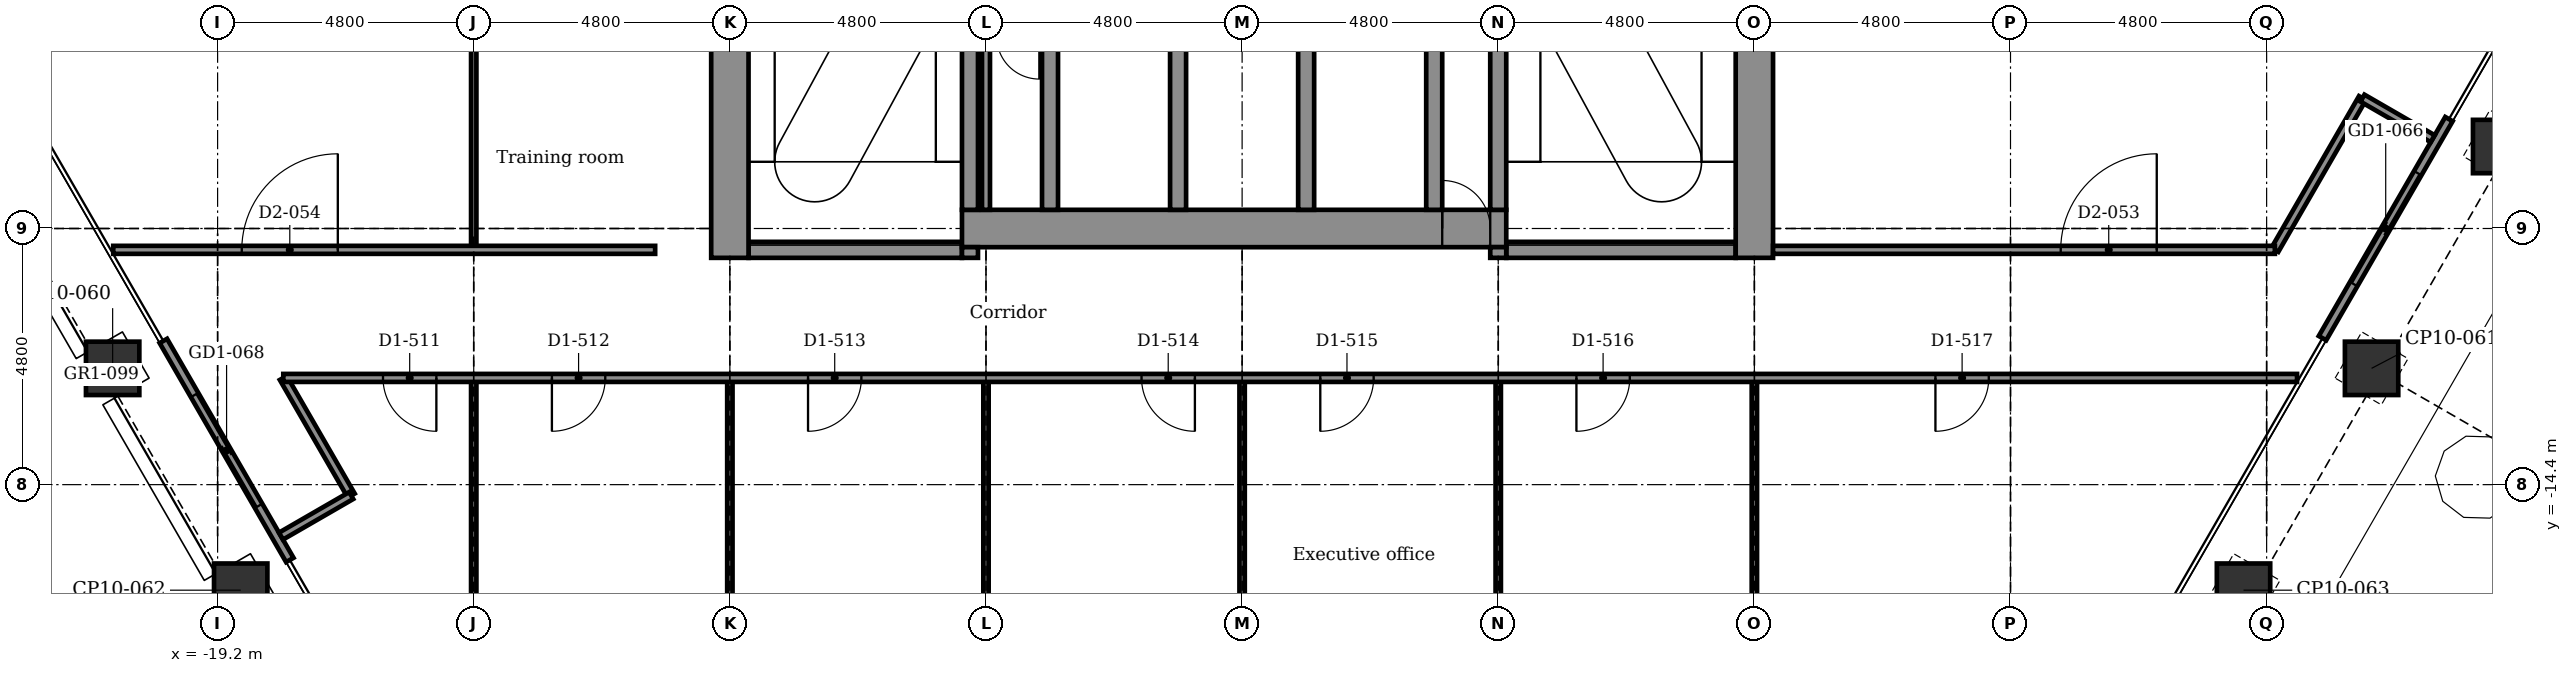
"""IFC4 building model, lengths in metres.
Left out: names, types, materials, properties, quantities, classifications, styles, units other than length and angle.
Written with IfcOpenShell. Run it as: python <this file> out.ifc"""

import sys

from ifc_helpers import new_model, si_unit, direction, frame, frame_2d, origin, origin_2d, place, context, subcontext, project, spatial, rectangle, extrude, element, fill, save


model = new_model("IFC4")
c1 = context("Model", 3, precision=1e-05, world=origin(), true_north=direction((0.0, 1.0)))
c2 = subcontext(c1, "Body", "Model", "MODEL_VIEW")
j1 = project(units=[si_unit("LENGTHUNIT", "METRE"), si_unit("PLANEANGLEUNIT", "RADIAN")], contexts=[c1])
p1 = place(None, origin())
s1 = spatial("IfcSite", under=j1, at=p1, CompositionType="ELEMENT")
p2 = place(p1, origin())
s2 = spatial("IfcBuilding", under=s1, at=p2, CompositionType="ELEMENT")
p3 = place(p2, frame((0.0, 0.0, 181.7)))
s3 = spatial("IfcBuildingStorey", under=s2, at=p3, CompositionType="ELEMENT", Elevation=181.7)
for number, where, z_axis, x_axis in (
    (1, (23.567, -8.064, -0.15), (0.0, 0.0, 1.0), (0.5, 0.866, 0.0)),
    (2, (21.167, -12.221, -0.15), (0.0, 0.0, 1.0), (0.5, 0.866, 0.0)),
    (3, (18.767, -16.378, -0.15), (0.0, 0.0, 1.0), (0.5, 0.866, 0.0)),
    (4, (-18.767, -16.378, -0.15), (0.0, 0.0, 1.0), (0.866, 0.5, 0.0)),
    (5, (-21.167, -12.221, -0.15), (0.0, 0.0, 1.0), (0.866, 0.5, 0.0)),
):
    element("IfcColumn", number, at=place(p3, frame(where, z_axis=z_axis, x_axis=x_axis)), inside=s3, PredefinedType="COLUMN", context=c2, shape_type="SweptSolid", body=[
        extrude(rectangle(XDim=1.0, YDim=1.0, at=origin_2d()), origin(), (0.0, 0.0, 1.0), 3.9),
    ])
p4 = place(p3, frame((-9.25, -10.0, -0.15), z_axis=(0.0, 0.0, 1.0), x_axis=(1.0, 0.0, 0.0)))
e6 = element("IfcWall", 6, at=p4, inside=s3, PredefinedType="STANDARD", context=c2, shape_type="SweptSolid", body=[
    extrude(rectangle(XDim=4.0, YDim=0.3, at=frame_2d((2.0, 0.0))), origin(), (0.0, 0.0, 1.0), 3.9),
])
p5 = place(p3, frame((4.95, -10.0, -0.15), z_axis=(0.0, 0.0, 1.0), x_axis=(1.0, 0.0, 0.0)))
e7 = element("IfcWall", 7, at=p5, inside=s3, PredefinedType="STANDARD", context=c2, shape_type="SweptSolid", body=[
    extrude(rectangle(XDim=4.3, YDim=0.3, at=frame_2d((2.15, 0.0))), origin(), (0.0, 0.0, 1.0), 3.9),
])
p6 = place(p3, frame((-5.25, -9.6, -0.15), z_axis=(0.0, 0.0, 1.0), x_axis=(1.0, 0.0, 0.0)))
e8 = element("IfcWall", 8, at=p6, inside=s3, PredefinedType="SHEAR", context=c2, shape_type="SweptSolid", body=[
    extrude(rectangle(XDim=10.2, YDim=0.7, at=frame_2d((5.1, 0.0))), origin(), (0.0, 0.0, 1.0), 3.9),
])
p7 = place(p6, frame((9.0, 0.0, 0.15)))
e9 = element("IfcOpeningElement", 9, at=p7, cuts=e8, PredefinedType="OPENING", context=c2, shape_type="SweptSolid", body=[
    extrude(rectangle(XDim=0.9, YDim=2.1, at=frame_2d((0.45, 1.05))), frame((0.0, 0.36, 0.0), z_axis=(0.0, -1.0, 0.0), x_axis=(1.0, 0.0, 0.0)), (0.0, 0.0, 1.0), 0.72),
])
p8 = place(p3, frame((-9.6, -10.15, -0.15), z_axis=(0.0, 0.0, 1.0), x_axis=(0.0, 1.0, 0.0)))
e10 = element("IfcWall", 10, at=p8, inside=s3, PredefinedType="SHEAR", context=c2, shape_type="SweptSolid", body=[
    extrude(rectangle(XDim=7.6, YDim=0.7, at=frame_2d((3.8, 0.0))), origin(), (0.0, 0.0, 1.0), 3.9),
])
p9 = place(p3, frame((-5.1, -10.15, -0.15), z_axis=(0.0, 0.0, 1.0), x_axis=(0.0, 1.0, 0.0)))
e11 = element("IfcWall", 11, at=p9, inside=s3, PredefinedType="STANDARD", context=c2, shape_type="SweptSolid", body=[
    extrude(rectangle(XDim=0.2, YDim=0.3, at=frame_2d((0.1, 0.0))), origin(), (0.0, 0.0, 1.0), 3.9),
])
p10 = place(p3, frame((-5.1, -9.25, -0.15), z_axis=(0.0, 0.0, 1.0), x_axis=(0.0, 1.0, 0.0)))
e12 = element("IfcWall", 12, at=p10, inside=s3, PredefinedType="STANDARD", context=c2, shape_type="SweptSolid", body=[
    extrude(rectangle(XDim=7.0, YDim=0.3, at=frame_2d((3.5, 0.0))), origin(), (0.0, 0.0, 1.0), 3.9),
])
p11 = place(p10, frame((3.8, 0.0, 0.15)))
e13 = element("IfcOpeningElement", 13, at=p11, cuts=e12, PredefinedType="OPENING", context=c2, shape_type="SweptSolid", body=[
    extrude(rectangle(XDim=1.2, YDim=2.1, at=frame_2d((0.6, 1.05))), frame((0.0, 0.16, 0.0), z_axis=(0.0, -1.0, 0.0), x_axis=(1.0, 0.0, 0.0)), (0.0, 0.0, 1.0), 0.32),
])
for number, where, z_axis, x_axis in (
    (14, (-3.6, -9.25, -0.15), (0.0, 0.0, 1.0), (0.0, 1.0, 0.0)),
    (15, (-1.2, -9.25, -0.15), (0.0, 0.0, 1.0), (0.0, 1.0, 0.0)),
    (16, (1.2, -9.25, -0.15), (0.0, 0.0, 1.0), (0.0, 1.0, 0.0)),
    (17, (3.6, -9.25, -0.15), (0.0, 0.0, 1.0), (0.0, 1.0, 0.0)),
):
    element("IfcWall", number, at=place(p3, frame(where, z_axis=z_axis, x_axis=x_axis)), inside=s3, PredefinedType="STANDARD", context=c2, shape_type="SweptSolid", body=[
        extrude(rectangle(XDim=3.4, YDim=0.3, at=frame_2d((1.7, 0.0))), origin(), (0.0, 0.0, 1.0), 3.9),
    ])
p12 = place(p3, frame((4.8, -10.15, -0.15), z_axis=(0.0, 0.0, 1.0), x_axis=(0.0, 1.0, 0.0)))
e18 = element("IfcWall", 18, at=p12, inside=s3, PredefinedType="STANDARD", context=c2, shape_type="SweptSolid", body=[
    extrude(rectangle(XDim=0.2, YDim=0.3, at=frame_2d((0.1, 0.0))), origin(), (0.0, 0.0, 1.0), 3.9),
])
p13 = place(p3, frame((4.8, -9.25, -0.15), z_axis=(0.0, 0.0, 1.0), x_axis=(0.0, 1.0, 0.0)))
e19 = element("IfcWall", 19, at=p13, inside=s3, PredefinedType="STANDARD", context=c2, shape_type="SweptSolid", body=[
    extrude(rectangle(XDim=7.0, YDim=0.3, at=frame_2d((3.5, 0.0))), origin(), (0.0, 0.0, 1.0), 3.9),
])
p14 = place(p13, frame((3.8, 0.0, 0.15)))
e20 = element("IfcOpeningElement", 20, at=p14, cuts=e19, PredefinedType="OPENING", context=c2, shape_type="SweptSolid", body=[
    extrude(rectangle(XDim=1.2, YDim=2.1, at=frame_2d((0.6, 1.05))), frame((0.0, 0.16, 0.0), z_axis=(0.0, -1.0, 0.0), x_axis=(1.0, 0.0, 0.0)), (0.0, 0.0, 1.0), 0.32),
])
p15 = place(p3, frame((9.6, -10.15, -0.15), z_axis=(0.0, 0.0, 1.0), x_axis=(0.0, 1.0, 0.0)))
e21 = element("IfcWall", 21, at=p15, inside=s3, PredefinedType="SHEAR", context=c2, shape_type="SweptSolid", body=[
    extrude(rectangle(XDim=20.1, YDim=0.7, at=frame_2d((10.05, 0.0))), origin(), (0.0, 0.0, 1.0), 3.9),
])
p16 = place(p3, frame((22.617, -7.55, 0.0), z_axis=(0.0, 0.0, 1.0), x_axis=(-0.5000167099, -0.866015756104, 0.0)))
e22 = element("IfcWall", 22, at=p16, inside=s3, PredefinedType="PARTITIONING", context=c2, shape_type="SweptSolid", body=[
    extrude(rectangle(XDim=4.74, YDim=0.16, at=frame_2d((2.37, 0.0))), origin(), (0.0, 0.0, 1.0), 3.75),
])
p17 = place(p16, frame((1.17, 0.0, 0.0)))
e23 = element("IfcOpeningElement", 23, at=p17, cuts=e22, PredefinedType="OPENING", context=c2, shape_type="SweptSolid", body=[
    extrude(rectangle(XDim=2.4, YDim=2.4, at=frame_2d((1.2, 1.2))), frame((0.0, 0.09, 0.0), z_axis=(0.0, -1.0, 0.0), x_axis=(1.0, 0.0, 0.0)), (0.0, 0.0, 1.0), 0.18),
])
p18 = place(p3, frame((-17.847, -15.812, 0.0), z_axis=(0.0, 0.0, 1.0), x_axis=(-0.5000167099, 0.866015756104, 0.0)))
e24 = element("IfcWall", 24, at=p18, inside=s3, PredefinedType="PARTITIONING", context=c2, shape_type="SweptSolid", body=[
    extrude(rectangle(XDim=4.74, YDim=0.16, at=frame_2d((2.37, 0.0))), origin(), (0.0, 0.0, 1.0), 3.75),
])
p19 = place(p18, frame((1.17, 0.0, 0.0)))
e25 = element("IfcOpeningElement", 25, at=p19, cuts=e24, PredefinedType="OPENING", context=c2, shape_type="SweptSolid", body=[
    extrude(rectangle(XDim=2.4, YDim=2.4, at=frame_2d((1.2, 1.2))), frame((0.0, 0.09, 0.0), z_axis=(0.0, -1.0, 0.0), x_axis=(1.0, 0.0, 0.0)), (0.0, 0.0, 1.0), 0.18),
])
p20 = place(p3, frame((9.6, -23.271, 0.0), z_axis=(0.0, 0.0, 1.0), x_axis=(0.0, 1.0, 0.0)))
e26 = element("IfcWall", 26, at=p20, inside=s3, PredefinedType="PARTITIONING", context=c2, shape_type="SweptSolid", body=[
    extrude(rectangle(XDim=10.872, YDim=0.1, at=frame_2d((5.436, 0.0))), origin(), (0.0, 0.0, 1.0), 3.066),
])
for number, where, z_axis, x_axis in (
    (27, (4.8, -23.281, 0.0), (0.0, 0.0, 1.0), (0.0, 1.0, 0.0)),
    (28, (0.0, -23.281, 0.0), (0.0, 0.0, 1.0), (0.0, 1.0, 0.0)),
):
    element("IfcWall", number, at=place(p3, frame(where, z_axis=z_axis, x_axis=x_axis)), inside=s3, PredefinedType="PARTITIONING", context=c2, shape_type="SweptSolid", body=[
        extrude(rectangle(XDim=10.882, YDim=0.1, at=frame_2d((5.441, 0.0))), origin(), (0.0, 0.0, 1.0), 3.066),
    ])
p21 = place(p3, frame((-4.8, -23.271, 0.0), z_axis=(0.0, 0.0, 1.0), x_axis=(0.0, 1.0, 0.0)))
e29 = element("IfcWall", 29, at=p21, inside=s3, PredefinedType="PARTITIONING", context=c2, shape_type="SweptSolid", body=[
    extrude(rectangle(XDim=10.872, YDim=0.1, at=frame_2d((5.436, 0.0))), origin(), (0.0, 0.0, 1.0), 3.066),
])
p22 = place(p3, frame((-4.8, -9.25, 0.0), z_axis=(0.0, 0.0, 1.0), x_axis=(0.0, 1.0, 0.0)))
e30 = element("IfcWall", 30, at=p22, inside=s3, PredefinedType="PARTITIONING", context=c2, shape_type="SweptSolid", body=[
    extrude(rectangle(XDim=3.25, YDim=0.15, at=frame_2d((1.625, 0.0))), origin(), (0.0, 0.0, 1.0), 3.75),
])
p23 = place(p3, frame((-9.6, -23.271, 0.0), z_axis=(0.0, 0.0, 1.0), x_axis=(0.0, 1.0, 0.0)))
e31 = element("IfcWall", 31, at=p23, inside=s3, PredefinedType="PARTITIONING", context=c2, shape_type="SweptSolid", body=[
    extrude(rectangle(XDim=10.872, YDim=0.1, at=frame_2d((5.436, 0.0))), origin(), (0.0, 0.0, 1.0), 3.066),
])
p24 = place(p3, frame((-14.4, -21.701, 0.0), z_axis=(0.0, 0.0, 1.0), x_axis=(0.0, 1.0, 0.0)))
e32 = element("IfcWall", 32, at=p24, inside=s3, PredefinedType="PARTITIONING", context=c2, shape_type="SweptSolid", body=[
    extrude(rectangle(XDim=9.302, YDim=0.1, at=frame_2d((4.651, 0.0))), origin(), (0.0, 0.0, 1.0), 3.066),
])
p25 = place(p3, frame((-14.4, -10.0, 0.0), z_axis=(0.0, 0.0, 1.0), x_axis=(0.0, 1.0, 0.0)))
e33 = element("IfcWall", 33, at=p25, inside=s3, PredefinedType="PARTITIONING", context=c2, shape_type="SweptSolid", body=[
    extrude(rectangle(XDim=19.694, YDim=0.1, at=frame_2d((9.847, 0.0))), origin(), (0.0, 0.0, 1.0), 3.75),
])
p26 = place(p3, frame((-17.969, -12.4, 0.0), z_axis=(0.0, 0.0, 1.0), x_axis=(0.499996383721, -0.866027491634, 0.0)))
e34 = element("IfcWall", 34, at=p26, inside=s3, PredefinedType="PARTITIONING", context=c2, shape_type="SweptSolid", body=[
    extrude(rectangle(XDim=2.546, YDim=0.15, at=frame_2d((1.273, 0.0))), origin(), (0.0, 0.0, 1.0), 3.75),
])
p27 = place(p3, frame((19.354, -10.0, 0.0), z_axis=(0.0, 0.0, 1.0), x_axis=(0.500009969958, 0.86601964755, 0.0)))
e35 = element("IfcWall", 35, at=p27, inside=s3, PredefinedType="PARTITIONING", context=c2, shape_type="SweptSolid", body=[
    extrude(rectangle(XDim=3.283, YDim=0.15, at=frame_2d((1.642, 0.0))), origin(), (0.0, 0.0, 1.0), 3.75),
])
p28 = place(p3, frame((20.996, -7.157, 0.0), z_axis=(0.0, 0.0, 1.0), x_axis=(0.865960906633, -0.500111695708, 0.0)))
e36 = element("IfcWall", 36, at=p28, inside=s3, PredefinedType="PARTITIONING", context=c2, shape_type="SweptSolid", body=[
    extrude(rectangle(XDim=1.52, YDim=0.15, at=frame_2d((0.76, 0.0))), origin(), (0.0, 0.0, 1.0), 3.75),
])
p29 = place(p3, frame((-18.012, -15.365, 0.0), z_axis=(0.0, 0.0, 1.0), x_axis=(0.866030456496, 0.499991248344, 0.0)))
e37 = element("IfcWall", 37, at=p29, inside=s3, PredefinedType="PARTITIONING", context=c2, shape_type="SweptSolid", body=[
    extrude(rectangle(XDim=1.52, YDim=0.15, at=frame_2d((0.76, 0.0))), origin(), (0.0, 0.0, 1.0), 3.75),
])
p30 = place(p3, frame((-17.969, -12.4, 0.0), z_axis=(0.0, 0.0, 1.0), x_axis=(1.0, 0.0, 0.0)))
e38 = element("IfcWall", 38, at=p30, inside=s3, PredefinedType="PARTITIONING", context=c2, shape_type="SweptSolid", body=[
    extrude(rectangle(XDim=37.739, YDim=0.15, at=frame_2d((18.87, 0.0))), origin(), (0.0, 0.0, 1.0), 3.75),
])
p31 = place(p30, frame((1.869, 0.0, 0.0)))
e39 = element("IfcOpeningElement", 39, at=p31, cuts=e38, PredefinedType="OPENING", context=c2, shape_type="SweptSolid", body=[
    extrude(rectangle(XDim=1.0, YDim=2.1, at=frame_2d((0.5, 1.05))), frame((0.0, 0.085, 0.0), z_axis=(0.0, -1.0, 0.0), x_axis=(1.0, 0.0, 0.0)), (0.0, 0.0, 1.0), 0.17),
])
p32 = place(p30, frame((5.034, 0.0, 0.0)))
e40 = element("IfcOpeningElement", 40, at=p32, cuts=e38, PredefinedType="OPENING", context=c2, shape_type="SweptSolid", body=[
    extrude(rectangle(XDim=1.0, YDim=2.1, at=frame_2d((0.5, 1.05))), frame((0.0, 0.085, 0.0), z_axis=(0.0, -1.0, 0.0), x_axis=(1.0, 0.0, 0.0)), (0.0, 0.0, 1.0), 0.17),
])
p33 = place(p30, frame((9.834, 0.0, 0.0)))
e41 = element("IfcOpeningElement", 41, at=p33, cuts=e38, PredefinedType="OPENING", context=c2, shape_type="SweptSolid", body=[
    extrude(rectangle(XDim=1.0, YDim=2.1, at=frame_2d((0.5, 1.05))), frame((0.0, 0.085, 0.0), z_axis=(0.0, -1.0, 0.0), x_axis=(1.0, 0.0, 0.0)), (0.0, 0.0, 1.0), 0.17),
])
p34 = place(p30, frame((16.084, 0.0, 0.0)))
e42 = element("IfcOpeningElement", 42, at=p34, cuts=e38, PredefinedType="OPENING", context=c2, shape_type="SweptSolid", body=[
    extrude(rectangle(XDim=1.0, YDim=2.1, at=frame_2d((0.5, 1.05))), frame((0.0, 0.085, 0.0), z_axis=(0.0, -1.0, 0.0), x_axis=(1.0, 0.0, 0.0)), (0.0, 0.0, 1.0), 0.17),
])
p35 = place(p30, frame((19.434, 0.0, 0.0)))
e43 = element("IfcOpeningElement", 43, at=p35, cuts=e38, PredefinedType="OPENING", context=c2, shape_type="SweptSolid", body=[
    extrude(rectangle(XDim=1.0, YDim=2.1, at=frame_2d((0.5, 1.05))), frame((0.0, 0.085, 0.0), z_axis=(0.0, -1.0, 0.0), x_axis=(1.0, 0.0, 0.0)), (0.0, 0.0, 1.0), 0.17),
])
p36 = place(p30, frame((24.234, 0.0, 0.0)))
e44 = element("IfcOpeningElement", 44, at=p36, cuts=e38, PredefinedType="OPENING", context=c2, shape_type="SweptSolid", body=[
    extrude(rectangle(XDim=1.0, YDim=2.1, at=frame_2d((0.5, 1.05))), frame((0.0, 0.085, 0.0), z_axis=(0.0, -1.0, 0.0), x_axis=(1.0, 0.0, 0.0)), (0.0, 0.0, 1.0), 0.17),
])
p37 = place(p30, frame((30.962, 0.0, 0.0)))
e45 = element("IfcOpeningElement", 45, at=p37, cuts=e38, PredefinedType="OPENING", context=c2, shape_type="SweptSolid", body=[
    extrude(rectangle(XDim=1.0, YDim=2.1, at=frame_2d((0.5, 1.05))), frame((0.0, 0.085, 0.0), z_axis=(0.0, -1.0, 0.0), x_axis=(1.0, 0.0, 0.0)), (0.0, 0.0, 1.0), 0.17),
])
p38 = place(p3, frame((-21.156, -10.0, 0.0), z_axis=(0.0, 0.0, 1.0), x_axis=(1.0, 0.0, 0.0)))
e46 = element("IfcWall", 46, at=p38, inside=s3, PredefinedType="PARTITIONING", context=c2, shape_type="SweptSolid", body=[
    extrude(rectangle(XDim=10.156, YDim=0.15, at=frame_2d((5.078, 0.0))), origin(), (0.0, 0.0, 1.0), 3.75),
])
p39 = place(p38, frame((2.409, 0.0, 0.0)))
e47 = element("IfcOpeningElement", 47, at=p39, cuts=e46, PredefinedType="OPENING", context=c2, shape_type="SweptSolid", body=[
    extrude(rectangle(XDim=1.8, YDim=2.1, at=frame_2d((0.9, 1.05))), frame((0.0, 0.085, 0.0), z_axis=(0.0, -1.0, 0.0), x_axis=(1.0, 0.0, 0.0)), (0.0, 0.0, 1.0), 0.17),
])
p40 = place(p3, frame((9.95, -10.0, 0.0), z_axis=(0.0, 0.0, 1.0), x_axis=(1.0, 0.0, 0.0)))
e48 = element("IfcWall", 48, at=p40, inside=s3, PredefinedType="PARTITIONING", context=c2, shape_type="SweptSolid", body=[
    extrude(rectangle(XDim=9.405, YDim=0.15, at=frame_2d((4.702, 0.0))), origin(), (0.0, 0.0, 1.0), 3.75),
])
p41 = place(p40, frame((5.391, 0.0, 0.0)))
e49 = element("IfcOpeningElement", 49, at=p41, cuts=e48, PredefinedType="OPENING", context=c2, shape_type="SweptSolid", body=[
    extrude(rectangle(XDim=1.8, YDim=2.1, at=frame_2d((0.9, 1.05))), frame((0.0, 0.085, 0.0), z_axis=(0.0, -1.0, 0.0), x_axis=(1.0, 0.0, 0.0)), (0.0, 0.0, 1.0), 0.17),
])
p42 = place(p17, origin())
e50 = element("IfcDoor", 50, at=p42, inside=s3, OperationType="DOUBLE_DOOR_SLIDING", PredefinedType="DOOR", context=c2, shape_type="SweptSolid", body=[
    extrude(rectangle(XDim=2.4, YDim=2.4, at=frame_2d((1.2, 1.2))), frame((0.0, 0.025, 0.0), z_axis=(0.0, -1.0, 0.0), x_axis=(1.0, 0.0, 0.0)), (0.0, 0.0, 1.0), 0.05),
])
fill(e23, e50)
p43 = place(p19, origin())
e51 = element("IfcDoor", 51, at=p43, inside=s3, OperationType="DOUBLE_DOOR_SLIDING", PredefinedType="DOOR", context=c2, shape_type="SweptSolid", body=[
    extrude(rectangle(XDim=2.4, YDim=2.4, at=frame_2d((1.2, 1.2))), frame((0.0, 0.025, 0.0), z_axis=(0.0, -1.0, 0.0), x_axis=(1.0, 0.0, 0.0)), (0.0, 0.0, 1.0), 0.05),
])
fill(e25, e51)
p44 = place(p31, frame((1.0, 0.0, 0.0), z_axis=(0.0, 0.0, 1.0), x_axis=(-1.0, 0.0, 0.0)))
e52 = element("IfcDoor", 52, at=p44, inside=s3, OperationType="SINGLE_SWING_RIGHT", PredefinedType="DOOR", context=c2, shape_type="SweptSolid", body=[
    extrude(rectangle(XDim=1.0, YDim=2.1, at=frame_2d((0.5, 1.05))), frame((0.0, 0.025, 0.0), z_axis=(0.0, -1.0, 0.0), x_axis=(1.0, 0.0, 0.0)), (0.0, 0.0, 1.0), 0.05),
])
fill(e39, e52)
p45 = place(p32, frame((1.0, 0.0, 0.0), z_axis=(0.0, 0.0, 1.0), x_axis=(-1.0, 0.0, 0.0)))
e53 = element("IfcDoor", 53, at=p45, inside=s3, OperationType="SINGLE_SWING_LEFT", PredefinedType="DOOR", context=c2, shape_type="SweptSolid", body=[
    extrude(rectangle(XDim=1.0, YDim=2.1, at=frame_2d((0.5, 1.05))), frame((0.0, 0.025, 0.0), z_axis=(0.0, -1.0, 0.0), x_axis=(1.0, 0.0, 0.0)), (0.0, 0.0, 1.0), 0.05),
])
fill(e40, e53)
p46 = place(p33, frame((1.0, 0.0, 0.0), z_axis=(0.0, 0.0, 1.0), x_axis=(-1.0, 0.0, 0.0)))
e54 = element("IfcDoor", 54, at=p46, inside=s3, OperationType="SINGLE_SWING_LEFT", PredefinedType="DOOR", context=c2, shape_type="SweptSolid", body=[
    extrude(rectangle(XDim=1.0, YDim=2.1, at=frame_2d((0.5, 1.05))), frame((0.0, 0.025, 0.0), z_axis=(0.0, -1.0, 0.0), x_axis=(1.0, 0.0, 0.0)), (0.0, 0.0, 1.0), 0.05),
])
fill(e41, e54)
p47 = place(p34, frame((1.0, 0.0, 0.0), z_axis=(0.0, 0.0, 1.0), x_axis=(-1.0, 0.0, 0.0)))
e55 = element("IfcDoor", 55, at=p47, inside=s3, OperationType="SINGLE_SWING_RIGHT", PredefinedType="DOOR", context=c2, shape_type="SweptSolid", body=[
    extrude(rectangle(XDim=1.0, YDim=2.1, at=frame_2d((0.5, 1.05))), frame((0.0, 0.025, 0.0), z_axis=(0.0, -1.0, 0.0), x_axis=(1.0, 0.0, 0.0)), (0.0, 0.0, 1.0), 0.05),
])
fill(e42, e55)
p48 = place(p35, frame((1.0, 0.0, 0.0), z_axis=(0.0, 0.0, 1.0), x_axis=(-1.0, 0.0, 0.0)))
e56 = element("IfcDoor", 56, at=p48, inside=s3, OperationType="SINGLE_SWING_LEFT", PredefinedType="DOOR", context=c2, shape_type="SweptSolid", body=[
    extrude(rectangle(XDim=1.0, YDim=2.1, at=frame_2d((0.5, 1.05))), frame((0.0, 0.025, 0.0), z_axis=(0.0, -1.0, 0.0), x_axis=(1.0, 0.0, 0.0)), (0.0, 0.0, 1.0), 0.05),
])
fill(e43, e56)
p49 = place(p36, frame((1.0, 0.0, 0.0), z_axis=(0.0, 0.0, 1.0), x_axis=(-1.0, 0.0, 0.0)))
e57 = element("IfcDoor", 57, at=p49, inside=s3, OperationType="SINGLE_SWING_LEFT", PredefinedType="DOOR", context=c2, shape_type="SweptSolid", body=[
    extrude(rectangle(XDim=1.0, YDim=2.1, at=frame_2d((0.5, 1.05))), frame((0.0, 0.025, 0.0), z_axis=(0.0, -1.0, 0.0), x_axis=(1.0, 0.0, 0.0)), (0.0, 0.0, 1.0), 0.05),
])
fill(e44, e57)
p50 = place(p37, frame((1.0, 0.0, 0.0), z_axis=(0.0, 0.0, 1.0), x_axis=(-1.0, 0.0, 0.0)))
e58 = element("IfcDoor", 58, at=p50, inside=s3, OperationType="SINGLE_SWING_LEFT", PredefinedType="DOOR", context=c2, shape_type="SweptSolid", body=[
    extrude(rectangle(XDim=1.0, YDim=2.1, at=frame_2d((0.5, 1.05))), frame((0.0, 0.025, 0.0), z_axis=(0.0, -1.0, 0.0), x_axis=(1.0, 0.0, 0.0)), (0.0, 0.0, 1.0), 0.05),
])
fill(e45, e58)
p51 = place(p41, origin())
e59 = element("IfcDoor", 59, at=p51, inside=s3, OperationType="SINGLE_SWING_RIGHT", PredefinedType="DOOR", context=c2, shape_type="SweptSolid", body=[
    extrude(rectangle(XDim=1.8, YDim=2.1, at=frame_2d((0.9, 1.05))), frame((0.0, 0.025, 0.0), z_axis=(0.0, -1.0, 0.0), x_axis=(1.0, 0.0, 0.0)), (0.0, 0.0, 1.0), 0.05),
])
fill(e49, e59)
p52 = place(p39, origin())
e60 = element("IfcDoor", 60, at=p52, inside=s3, OperationType="SINGLE_SWING_RIGHT", PredefinedType="DOOR", context=c2, shape_type="SweptSolid", body=[
    extrude(rectangle(XDim=1.8, YDim=2.1, at=frame_2d((0.9, 1.05))), frame((0.0, 0.025, 0.0), z_axis=(0.0, -1.0, 0.0), x_axis=(1.0, 0.0, 0.0)), (0.0, 0.0, 1.0), 0.05),
])
fill(e47, e60)
p53 = place(p7, origin())
e61 = element("IfcDoor", 61, at=p53, inside=s3, OperationType="SINGLE_SWING_LEFT", PredefinedType="DOOR", context=c2, shape_type="SweptSolid", body=[
    extrude(rectangle(XDim=0.9, YDim=2.1, at=frame_2d((0.45, 1.05))), frame((0.0, 0.025, 0.0), z_axis=(0.0, -1.0, 0.0), x_axis=(1.0, 0.0, 0.0)), (0.0, 0.0, 1.0), 0.05),
])
fill(e9, e61)
save(model, sys.argv[1])
